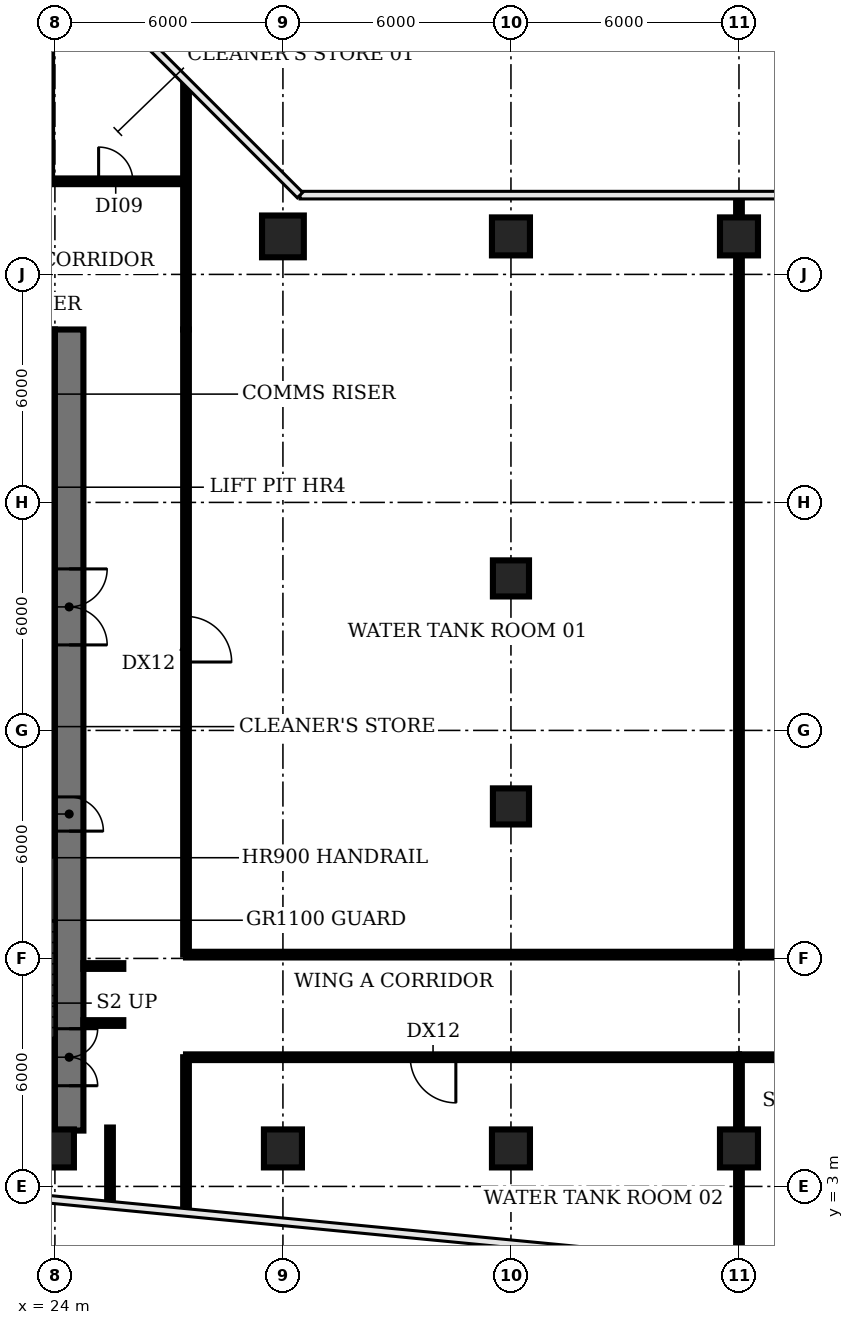
"""IFC4 building model, lengths in metres.
Left out: names, types, materials, properties, quantities, classifications, styles, units other than length and angle.
Written with IfcOpenShell. Run it as: python <this file> out.ifc"""

import sys

from ifc_helpers import new_model, si_unit, direction, frame, frame_2d, origin, origin_2d, place, context, subcontext, project, spatial, rectangle, circle, extrude, element, fill, save


model = new_model("IFC4")
c1 = context("Model", 3, precision=1e-05, world=origin(), true_north=direction((0.0, 1.0)))
c2 = subcontext(c1, "Body", "Model", "MODEL_VIEW")
j1 = project(units=[si_unit("LENGTHUNIT", "METRE"), si_unit("PLANEANGLEUNIT", "RADIAN")], contexts=[c1])
p1 = place(None, origin())
s1 = spatial("IfcSite", under=j1, at=p1, CompositionType="ELEMENT")
p2 = place(p1, origin())
s2 = spatial("IfcBuilding", under=s1, at=p2, CompositionType="ELEMENT")
p3 = place(p2, frame((0.0, 0.0, 134.0)))
s3 = spatial("IfcBuildingStorey", under=s2, at=p3, CompositionType="ELEMENT", Elevation=134.0)
for number, where, z_axis, x_axis in (
    (1, (24.0, 4.0, 0.0), (0.0, 0.0, 1.0), (1.0, 0.0, 0.0)),
    (2, (30.0, 4.0, 0.0), (0.0, 0.0, 1.0), (1.0, 0.0, 0.0)),
):
    element("IfcColumn", number, at=place(p3, frame(where, z_axis=z_axis, x_axis=x_axis)), inside=s3, PredefinedType="COLUMN", context=c2, shape_type="SweptSolid", body=[
        extrude(rectangle(XDim=1.0, YDim=1.0, at=origin_2d()), origin(), (0.0, 0.0, 1.0), 3.2),
    ])
p4 = place(p3, frame((30.0, 28.0, 0.0), z_axis=(0.0, 0.0, 1.0), x_axis=(1.0, 0.0, 0.0)))
e3 = element("IfcColumn", 3, at=p4, inside=s3, PredefinedType="COLUMN", context=c2, shape_type="SweptSolid", body=[
    extrude(circle(Radius=0.55, at=origin_2d()), origin(), (0.0, 0.0, 1.0), 3.2),
])
p5 = place(p3, frame((36.0, 4.0, 0.0), z_axis=(0.0, 0.0, 1.0), x_axis=(1.0, 0.0, 0.0)))
e4 = element("IfcColumn", 4, at=p5, inside=s3, PredefinedType="COLUMN", context=c2, shape_type="SweptSolid", body=[
    extrude(rectangle(XDim=1.0, YDim=1.0, at=origin_2d()), origin(), (0.0, 0.0, 1.0), 3.2),
])
for number, where, z_axis, x_axis in (
    (5, (36.0, 13.0, 0.0), (0.0, 0.0, 1.0), (1.0, 0.0, 0.0)),
    (6, (36.0, 19.0, 0.0), (0.0, 0.0, 1.0), (1.0, 0.0, 0.0)),
):
    element("IfcColumn", number, at=place(p3, frame(where, z_axis=z_axis, x_axis=x_axis)), inside=s3, PredefinedType="COLUMN", context=c2, shape_type="SweptSolid", body=[
        extrude(rectangle(XDim=0.95, YDim=0.95, at=origin_2d()), origin(), (0.0, 0.0, 1.0), 3.2),
    ])
for number, where, z_axis, x_axis in (
    (7, (36.0, 28.0, 0.0), (0.0, 0.0, 1.0), (1.0, 0.0, 0.0)),
    (8, (42.0, 4.0, 0.0), (0.0, 0.0, 1.0), (1.0, 0.0, 0.0)),
    (9, (42.0, 28.0, 0.0), (0.0, 0.0, 1.0), (1.0, 0.0, 0.0)),
):
    element("IfcColumn", number, at=place(p3, frame(where, z_axis=z_axis, x_axis=x_axis)), inside=s3, PredefinedType="COLUMN", context=c2, shape_type="SweptSolid", body=[
        extrude(rectangle(XDim=1.0, YDim=1.0, at=origin_2d()), origin(), (0.0, 0.0, 1.0), 3.2),
    ])
p6 = place(p3, frame((20.85, 11.825, 0.0), z_axis=(0.0, 0.0, 1.0), x_axis=(1.0, 0.0, 0.0)))
e10 = element("IfcWall", 10, at=p6, inside=s3, PredefinedType="SHEAR", context=c2, shape_type="SweptSolid", body=[
    extrude(rectangle(XDim=3.15, YDim=0.25, at=frame_2d((1.575, 0.0))), origin(), (0.0, 0.0, 1.0), 3.8),
])
p7 = place(p3, frame((16.6, 13.7, 0.0), z_axis=(0.0, 0.0, 1.0), x_axis=(1.0, 0.0, 0.0)))
e11 = element("IfcWall", 11, at=p7, inside=s3, PredefinedType="PARTITIONING", context=c2, shape_type="SweptSolid", body=[
    extrude(rectangle(XDim=7.4, YDim=0.225, at=frame_2d((3.7, 0.0))), origin(), (0.0, 0.0, 1.0), 3.8),
])
p8 = place(p3, frame((9.4, 16.5, 0.0), z_axis=(0.0, 0.0, 1.0), x_axis=(1.0, 0.0, 0.0)))
e12 = element("IfcWall", 12, at=p8, inside=s3, PredefinedType="PARTITIONING", context=c2, shape_type="SweptSolid", body=[
    extrude(rectangle(XDim=14.6, YDim=0.225, at=frame_2d((7.3, 0.0))), origin(), (0.0, 0.0, 1.0), 3.8),
])
p9 = place(p8, frame((0.75, 0.0, 0.0)))
e13 = element("IfcOpeningElement", 13, at=p9, cuts=e12, PredefinedType="OPENING", context=c2, shape_type="SweptSolid", body=[
    extrude(rectangle(XDim=1.1, YDim=2.1, at=frame_2d((0.55, 1.05))), frame((0.0, 0.123, 0.0), z_axis=(0.0, -1.0, 0.0), x_axis=(1.0, 0.0, 0.0)), (0.0, 0.0, 1.0), 0.245),
])
p10 = place(p8, frame((3.55, 0.0, 0.0)))
e14 = element("IfcOpeningElement", 14, at=p10, cuts=e12, PredefinedType="OPENING", context=c2, shape_type="SweptSolid", body=[
    extrude(rectangle(XDim=1.1, YDim=2.1, at=frame_2d((0.55, 1.05))), frame((0.0, 0.123, 0.0), z_axis=(0.0, -1.0, 0.0), x_axis=(1.0, 0.0, 0.0)), (0.0, 0.0, 1.0), 0.245),
])
p11 = place(p8, frame((6.35, 0.0, 0.0)))
e15 = element("IfcOpeningElement", 15, at=p11, cuts=e12, PredefinedType="OPENING", context=c2, shape_type="SweptSolid", body=[
    extrude(rectangle(XDim=1.1, YDim=2.1, at=frame_2d((0.55, 1.05))), frame((0.0, 0.123, 0.0), z_axis=(0.0, -1.0, 0.0), x_axis=(1.0, 0.0, 0.0)), (0.0, 0.0, 1.0), 0.245),
])
p12 = place(p8, frame((9.15, 0.0, 0.0)))
e16 = element("IfcOpeningElement", 16, at=p12, cuts=e12, PredefinedType="OPENING", context=c2, shape_type="SweptSolid", body=[
    extrude(rectangle(XDim=1.1, YDim=2.1, at=frame_2d((0.55, 1.05))), frame((0.0, 0.123, 0.0), z_axis=(0.0, -1.0, 0.0), x_axis=(1.0, 0.0, 0.0)), (0.0, 0.0, 1.0), 0.245),
])
p13 = place(p8, frame((12.4, 0.0, 0.0)))
e17 = element("IfcOpeningElement", 17, at=p13, cuts=e12, PredefinedType="OPENING", context=c2, shape_type="SweptSolid", body=[
    extrude(rectangle(XDim=1.0, YDim=2.1, at=frame_2d((0.5, 1.05))), frame((0.0, 0.123, 0.0), z_axis=(0.0, -1.0, 0.0), x_axis=(1.0, 0.0, 0.0)), (0.0, 0.0, 1.0), 0.245),
])
p14 = place(p3, frame((24.0, 20.0, 0.0), z_axis=(0.0, 0.0, 1.0), x_axis=(-1.0, 0.0, 0.0)))
e18 = element("IfcWall", 18, at=p14, inside=s3, PredefinedType="PARTITIONING", context=c2, shape_type="SweptSolid", body=[
    extrude(rectangle(XDim=3.4, YDim=0.225, at=frame_2d((1.7, 0.0))), origin(), (0.0, 0.0, 1.0), 3.8),
])
p15 = place(p14, frame((1.2, 0.0, 0.0)))
e19 = element("IfcOpeningElement", 19, at=p15, cuts=e18, PredefinedType="OPENING", context=c2, shape_type="SweptSolid", body=[
    extrude(rectangle(XDim=1.0, YDim=2.1, at=frame_2d((0.5, 1.05))), frame((0.0, 0.123, 0.0), z_axis=(0.0, -1.0, 0.0), x_axis=(1.0, 0.0, 0.0)), (0.0, 0.0, 1.0), 0.245),
])
p16 = place(p3, frame((20.8, 22.8, 0.0), z_axis=(0.0, 0.0, 1.0), x_axis=(1.0, 0.0, 0.0)))
e20 = element("IfcWall", 20, at=p16, inside=s3, PredefinedType="PARTITIONING", context=c2, shape_type="SweptSolid", body=[
    extrude(rectangle(XDim=3.2, YDim=0.225, at=frame_2d((1.6, 0.0))), origin(), (0.0, 0.0, 1.0), 3.8),
])
p17 = place(p3, frame((24.375, 25.55, 0.0), z_axis=(0.0, 0.0, 1.0), x_axis=(0.0, -1.0, 0.0)))
e21 = element("IfcWall", 21, at=p17, inside=s3, PredefinedType="SHEAR", context=c2, shape_type="SweptSolid", body=[
    extrude(rectangle(XDim=21.08, YDim=0.75, at=frame_2d((10.54, 0.0))), origin(), (0.0, 0.0, 1.0), 3.8),
])
p18 = place(p17, frame((18.4, 0.0, 0.0)))
e22 = element("IfcOpeningElement", 22, at=p18, cuts=e21, PredefinedType="OPENING", context=c2, shape_type="SweptSolid", body=[
    extrude(rectangle(XDim=1.5, YDim=2.1, at=frame_2d((0.75, 1.05))), frame((0.0, 0.385, 0.0), z_axis=(0.0, -1.0, 0.0), x_axis=(1.0, 0.0, 0.0)), (0.0, 0.0, 1.0), 0.77),
])
p19 = place(p17, frame((12.3, 0.0, 0.0)))
e23 = element("IfcOpeningElement", 23, at=p19, cuts=e21, PredefinedType="OPENING", context=c2, shape_type="SweptSolid", body=[
    extrude(rectangle(XDim=0.9, YDim=2.1, at=frame_2d((0.45, 1.05))), frame((0.0, 0.385, 0.0), z_axis=(0.0, -1.0, 0.0), x_axis=(1.0, 0.0, 0.0)), (0.0, 0.0, 1.0), 0.77),
])
p20 = place(p17, frame((6.3, 0.0, 0.0)))
e24 = element("IfcOpeningElement", 24, at=p20, cuts=e21, PredefinedType="OPENING", context=c2, shape_type="SweptSolid", body=[
    extrude(rectangle(XDim=2.0, YDim=2.1, at=frame_2d((1.0, 1.05))), frame((0.0, 0.385, 0.0), z_axis=(0.0, -1.0, 0.0), x_axis=(1.0, 0.0, 0.0)), (0.0, 0.0, 1.0), 0.77),
])
p21 = place(p3, frame((24.0, 5.025, 0.0), z_axis=(0.0, 0.0, 1.0), x_axis=(-1.0, 0.0, 0.0)))
e25 = element("IfcWall", 25, at=p21, inside=s3, PredefinedType="SHEAR", context=c2, shape_type="SweptSolid", body=[
    extrude(rectangle(XDim=18.0, YDim=0.75, at=frame_2d((9.0, 0.0))), origin(), (0.0, 0.0, 1.0), 3.8),
])
p22 = place(p21, frame((0.825, 0.0, 0.0)))
e26 = element("IfcOpeningElement", 26, at=p22, cuts=e25, PredefinedType="OPENING", context=c2, shape_type="SweptSolid", body=[
    extrude(rectangle(XDim=1.5, YDim=2.1, at=frame_2d((0.75, 1.05))), frame((0.0, 0.385, 0.0), z_axis=(0.0, -1.0, 0.0), x_axis=(1.0, 0.0, 0.0)), (0.0, 0.0, 1.0), 0.77),
])
p23 = place(p21, frame((15.675, 0.0, 0.0)))
e27 = element("IfcOpeningElement", 27, at=p23, cuts=e25, PredefinedType="OPENING", context=c2, shape_type="SweptSolid", body=[
    extrude(rectangle(XDim=1.5, YDim=2.1, at=frame_2d((0.75, 1.05))), frame((0.0, 0.385, 0.0), z_axis=(0.0, -1.0, 0.0), x_axis=(1.0, 0.0, 0.0)), (0.0, 0.0, 1.0), 0.77),
])
p24 = place(p21, frame((13.0, 0.0, 0.0)))
e28 = element("IfcOpeningElement", 28, at=p24, cuts=e25, PredefinedType="OPENING", context=c2, shape_type="SweptSolid", body=[
    extrude(rectangle(XDim=1.2, YDim=2.1, at=frame_2d((0.6, 1.05))), frame((0.0, 0.385, 0.0), z_axis=(0.0, -1.0, 0.0), x_axis=(1.0, 0.0, 0.0)), (0.0, 0.0, 1.0), 0.77),
])
p25 = place(p21, frame((4.3, 0.0, 0.0)))
e29 = element("IfcOpeningElement", 29, at=p25, cuts=e25, PredefinedType="OPENING", context=c2, shape_type="SweptSolid", body=[
    extrude(rectangle(XDim=1.0, YDim=2.1, at=frame_2d((0.5, 1.05))), frame((0.0, 0.385, 0.0), z_axis=(0.0, -1.0, 0.0), x_axis=(1.0, 0.0, 0.0)), (0.0, 0.0, 1.0), 0.77),
])
p26 = place(p3, frame((6.0, 25.175, 0.0), z_axis=(0.0, 0.0, 1.0), x_axis=(1.0, 0.0, 0.0)))
e30 = element("IfcWall", 30, at=p26, inside=s3, PredefinedType="SHEAR", context=c2, shape_type="SweptSolid", body=[
    extrude(rectangle(XDim=18.0, YDim=0.75, at=frame_2d((9.0, 0.0))), origin(), (0.0, 0.0, 1.0), 3.8),
])
p27 = place(p3, frame((23.85, 29.45, 0.0), z_axis=(0.0, 0.0, 1.0), x_axis=(1.0, 0.0, 0.0)))
e31 = element("IfcWall", 31, at=p27, inside=s3, PredefinedType="PARTITIONING", context=c2, shape_type="SweptSolid", body=[
    extrude(rectangle(XDim=3.6, YDim=0.15, at=frame_2d((1.8, 0.0))), origin(), (0.0, 0.0, 1.0), 2.78),
])
p28 = place(p27, frame((1.3, 0.0, 0.0)))
e32 = element("IfcOpeningElement", 32, at=p28, cuts=e31, PredefinedType="OPENING", context=c2, shape_type="SweptSolid", body=[
    extrude(rectangle(XDim=0.9, YDim=2.1, at=frame_2d((0.45, 1.05))), frame((0.0, 0.085, 0.0), z_axis=(0.0, -1.0, 0.0), x_axis=(1.0, 0.0, 0.0)), (0.0, 0.0, 1.0), 0.17),
])
for number, where, z_axis, x_axis in (
    (33, (24.75, 7.3, 0.0), (0.0, 0.0, 1.0), (1.0, 0.0, 0.0)),
    (34, (24.75, 8.8, 0.0), (0.0, 0.0, 1.0), (1.0, 0.0, 0.0)),
):
    element("IfcWall", number, at=place(p3, frame(where, z_axis=z_axis, x_axis=x_axis)), inside=s3, PredefinedType="PARTITIONING", context=c2, shape_type="SweptSolid", body=[
        extrude(rectangle(XDim=1.05, YDim=0.15, at=frame_2d((0.525, 0.0))), origin(), (0.0, 0.0, 1.0), 2.78),
    ])
p29 = place(p3, frame((25.45, 2.56, 0.0), z_axis=(0.0, 0.0, 1.0), x_axis=(0.0, 1.0, 0.0)))
e35 = element("IfcWall", 35, at=p29, inside=s3, PredefinedType="PARTITIONING", context=c2, shape_type="SweptSolid", body=[
    extrude(rectangle(XDim=1.99, YDim=0.15, at=frame_2d((0.995, 0.0))), origin(), (0.0, 0.0, 1.0), 2.78),
])
p30 = place(p3, frame((27.45, 2.36, 0.0), z_axis=(0.0, 0.0, 1.0), x_axis=(0.0, 1.0, 0.0)))
e36 = element("IfcWall", 36, at=p30, inside=s3, PredefinedType="PARTITIONING", context=c2, shape_type="SweptSolid", body=[
    extrude(rectangle(XDim=4.04, YDim=0.15, at=frame_2d((2.02, 0.0))), origin(), (0.0, 0.0, 1.0), 2.78),
])
p31 = place(p3, frame((27.45, 9.1, 0.0), z_axis=(0.0, 0.0, 1.0), x_axis=(1.0, 0.0, 0.0)))
e37 = element("IfcWall", 37, at=p31, inside=s3, PredefinedType="PARTITIONING", context=c2, shape_type="SweptSolid", body=[
    extrude(rectangle(XDim=14.55, YDim=0.15, at=frame_2d((7.275, 0.0))), origin(), (0.0, 0.0, 1.0), 2.78),
])
p32 = place(p3, frame((27.45, 25.55, 0.0), z_axis=(0.0, 0.0, 1.0), x_axis=(0.0, -1.0, 0.0)))
e38 = element("IfcWall", 38, at=p32, inside=s3, PredefinedType="PARTITIONING", context=c2, shape_type="SweptSolid", body=[
    extrude(rectangle(XDim=16.45, YDim=0.15, at=frame_2d((8.225, 0.0))), origin(), (0.0, 0.0, 1.0), 2.78),
])
p33 = place(p32, frame((7.55, 0.0, 0.0)))
e39 = element("IfcOpeningElement", 39, at=p33, cuts=e38, PredefinedType="OPENING", context=c2, shape_type="SweptSolid", body=[
    extrude(rectangle(XDim=1.2, YDim=2.1, at=frame_2d((0.6, 1.05))), frame((0.0, 0.085, 0.0), z_axis=(0.0, -1.0, 0.0), x_axis=(1.0, 0.0, 0.0)), (0.0, 0.0, 1.0), 0.17),
])
p34 = place(p3, frame((27.45, 25.55, 0.0), z_axis=(0.0, 0.0, 1.0), x_axis=(0.0, 1.0, 0.0)))
e40 = element("IfcWall", 40, at=p34, inside=s3, PredefinedType="PARTITIONING", context=c2, shape_type="SweptSolid", body=[
    extrude(rectangle(XDim=6.47, YDim=0.15, at=frame_2d((3.235, 0.0))), origin(), (0.0, 0.0, 1.0), 2.78),
])
p35 = place(p3, frame((42.0, 0.96, 0.0), z_axis=(0.0, 0.0, 1.0), x_axis=(0.0, 1.0, 0.0)))
e41 = element("IfcWall", 41, at=p35, inside=s3, PredefinedType="PARTITIONING", context=c2, shape_type="SweptSolid", body=[
    extrude(rectangle(XDim=5.44, YDim=0.15, at=frame_2d((2.72, 0.0))), origin(), (0.0, 0.0, 1.0), 2.78),
])
p36 = place(p3, frame((42.0, 6.4, 0.0), z_axis=(0.0, 0.0, 1.0), x_axis=(-1.0, 0.0, 0.0)))
e42 = element("IfcWall", 42, at=p36, inside=s3, PredefinedType="PARTITIONING", context=c2, shape_type="SweptSolid", body=[
    extrude(rectangle(XDim=14.55, YDim=0.15, at=frame_2d((7.275, 0.0))), origin(), (0.0, 0.0, 1.0), 2.78),
])
p37 = place(p36, frame((7.45, 0.0, 0.0)))
e43 = element("IfcOpeningElement", 43, at=p37, cuts=e42, PredefinedType="OPENING", context=c2, shape_type="SweptSolid", body=[
    extrude(rectangle(XDim=1.2, YDim=2.1, at=frame_2d((0.6, 1.05))), frame((0.0, 0.085, 0.0), z_axis=(0.0, -1.0, 0.0), x_axis=(1.0, 0.0, 0.0)), (0.0, 0.0, 1.0), 0.17),
])
p38 = place(p3, frame((42.0, 9.1, 0.0), z_axis=(0.0, 0.0, 1.0), x_axis=(0.0, 1.0, 0.0)))
e44 = element("IfcWall", 44, at=p38, inside=s3, PredefinedType="PARTITIONING", context=c2, shape_type="SweptSolid", body=[
    extrude(rectangle(XDim=19.94, YDim=0.15, at=frame_2d((9.97, 0.0))), origin(), (0.0, 0.0, 1.0), 2.78),
])
p39 = place(p3, frame((42.0, 9.1, 0.0), z_axis=(0.0, 0.0, 1.0), x_axis=(1.0, 0.0, 0.0)))
e45 = element("IfcWall", 45, at=p39, inside=s3, PredefinedType="PARTITIONING", context=c2, shape_type="SweptSolid", body=[
    extrude(rectangle(XDim=9.88, YDim=0.15, at=frame_2d((4.94, 0.0))), origin(), (0.0, 0.0, 1.0), 2.78),
])
p40 = place(p39, frame((4.28, 0.0, 0.0)))
e46 = element("IfcOpeningElement", 46, at=p40, cuts=e45, PredefinedType="OPENING", context=c2, shape_type="SweptSolid", body=[
    extrude(rectangle(XDim=1.2, YDim=2.1, at=frame_2d((0.6, 1.05))), frame((0.0, 0.085, 0.0), z_axis=(0.0, -1.0, 0.0), x_axis=(1.0, 0.0, 0.0)), (0.0, 0.0, 1.0), 0.17),
])
p41 = place(p3, frame((51.78, 6.4, 0.0), z_axis=(0.0, 0.0, 1.0), x_axis=(-1.0, 0.0, 0.0)))
e47 = element("IfcWall", 47, at=p41, inside=s3, PredefinedType="PARTITIONING", context=c2, shape_type="SweptSolid", body=[
    extrude(rectangle(XDim=9.78, YDim=0.15, at=frame_2d((4.89, 0.0))), origin(), (0.0, 0.0, 1.0), 2.78),
])
p42 = place(p41, frame((5.08, 0.0, 0.0)))
e48 = element("IfcOpeningElement", 48, at=p42, cuts=e47, PredefinedType="OPENING", context=c2, shape_type="SweptSolid", body=[
    extrude(rectangle(XDim=1.2, YDim=2.1, at=frame_2d((0.6, 1.05))), frame((0.0, 0.085, 0.0), z_axis=(0.0, -1.0, 0.0), x_axis=(1.0, 0.0, 0.0)), (0.0, 0.0, 1.0), 0.17),
])
p43 = place(p18, origin())
e49 = element("IfcDoor", 49, at=p43, inside=s3, OperationType="DOUBLE_DOOR_SINGLE_SWING", PredefinedType="DOOR", context=c2, shape_type="SweptSolid", body=[
    extrude(rectangle(XDim=1.5, YDim=2.1, at=frame_2d((0.75, 1.05))), frame((0.0, 0.025, 0.0), z_axis=(0.0, -1.0, 0.0), x_axis=(1.0, 0.0, 0.0)), (0.0, 0.0, 1.0), 0.05),
])
fill(e22, e49)
p44 = place(p19, origin())
e50 = element("IfcDoor", 50, at=p44, inside=s3, OperationType="SINGLE_SWING_RIGHT", PredefinedType="DOOR", context=c2, shape_type="SweptSolid", body=[
    extrude(rectangle(XDim=0.9, YDim=2.1, at=frame_2d((0.45, 1.05))), frame((0.0, -0.315, 0.0), z_axis=(0.0, -1.0, 0.0), x_axis=(1.0, 0.0, 0.0)), (0.0, 0.0, 1.0), 0.05),
])
fill(e23, e50)
p45 = place(p20, origin())
e51 = element("IfcDoor", 51, at=p45, inside=s3, OperationType="DOUBLE_DOOR_SINGLE_SWING", PredefinedType="DOOR", context=c2, shape_type="SweptSolid", body=[
    extrude(rectangle(XDim=2.0, YDim=2.1, at=frame_2d((1.0, 1.05))), frame((0.0, 0.025, 0.0), z_axis=(0.0, -1.0, 0.0), x_axis=(1.0, 0.0, 0.0)), (0.0, 0.0, 1.0), 0.05),
])
fill(e24, e51)
p46 = place(p28, origin())
e52 = element("IfcDoor", 52, at=p46, inside=s3, OperationType="SINGLE_SWING_LEFT", PredefinedType="DOOR", context=c2, shape_type="SweptSolid", body=[
    extrude(rectangle(XDim=0.9, YDim=2.1, at=frame_2d((0.45, 1.05))), frame((0.0, 0.025, 0.0), z_axis=(0.0, -1.0, 0.0), x_axis=(1.0, 0.0, 0.0)), (0.0, 0.0, 1.0), 0.05),
])
fill(e32, e52)
p47 = place(p33, origin())
e53 = element("IfcDoor", 53, at=p47, inside=s3, OperationType="SINGLE_SWING_RIGHT", PredefinedType="DOOR", context=c2, shape_type="SweptSolid", body=[
    extrude(rectangle(XDim=1.2, YDim=2.1, at=frame_2d((0.6, 1.05))), frame((0.0, 0.025, 0.0), z_axis=(0.0, -1.0, 0.0), x_axis=(1.0, 0.0, 0.0)), (0.0, 0.0, 1.0), 0.05),
])
fill(e39, e53)
p48 = place(p37, origin())
e54 = element("IfcDoor", 54, at=p48, inside=s3, OperationType="SINGLE_SWING_LEFT", PredefinedType="DOOR", context=c2, shape_type="SweptSolid", body=[
    extrude(rectangle(XDim=1.2, YDim=2.1, at=frame_2d((0.6, 1.05))), frame((0.0, 0.025, 0.0), z_axis=(0.0, -1.0, 0.0), x_axis=(1.0, 0.0, 0.0)), (0.0, 0.0, 1.0), 0.05),
])
fill(e43, e54)
save(model, sys.argv[1])
